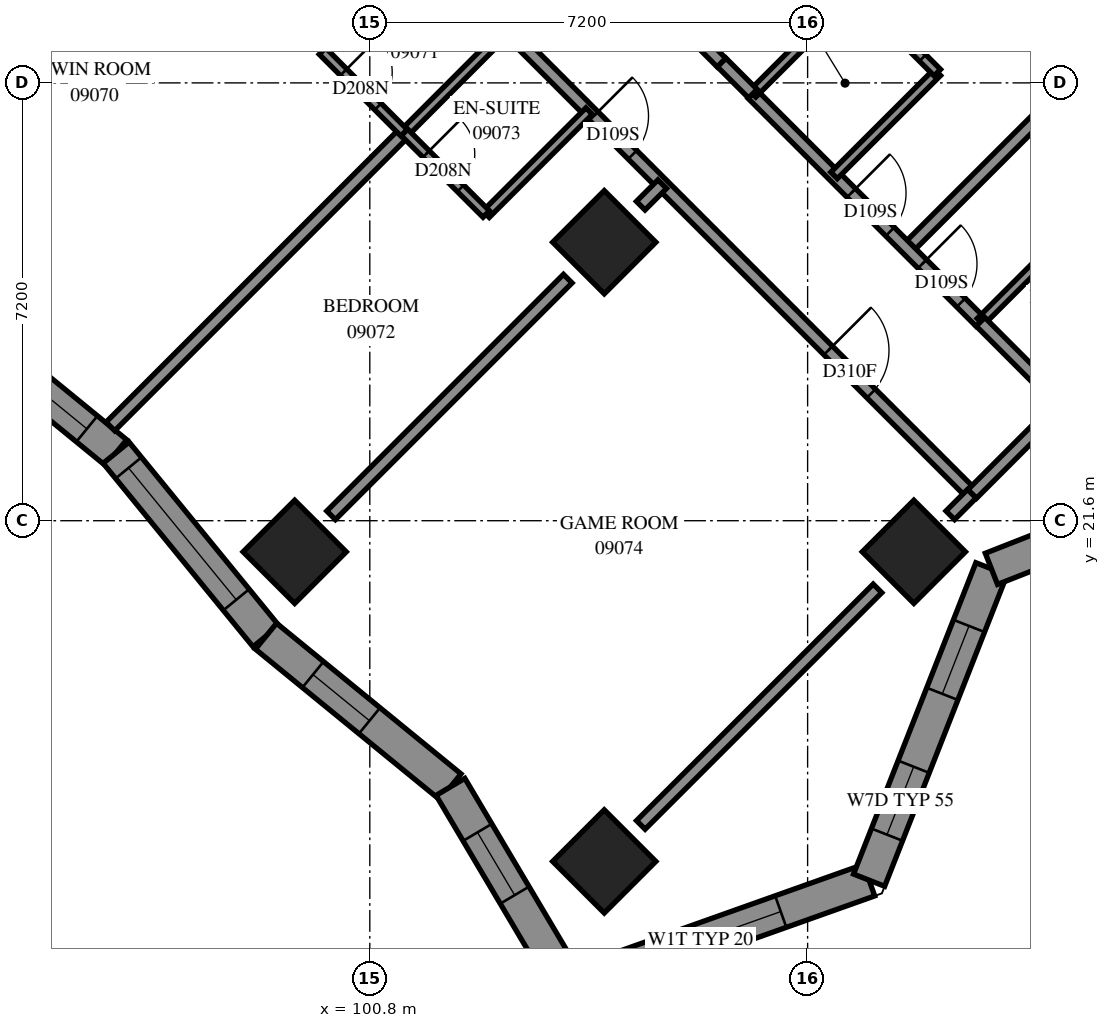
"""IFC4 building model, lengths in metres.
Left out: names, types, materials, properties, quantities, classifications, styles, units other than length and angle.
Written with IfcOpenShell. Run it as: python <this file> out.ifc"""

import sys

from ifc_helpers import new_model, si_unit, direction, frame, frame_2d, origin, origin_2d, place, context, subcontext, project, spatial, polyline, rectangle, outline, extrude, element, fill, save


model = new_model("IFC4")
c1 = context("Model", 3, precision=1e-05, world=origin(), true_north=direction((0.0, 1.0)))
c2 = subcontext(c1, "Body", "Model", "MODEL_VIEW")
j1 = project(units=[si_unit("LENGTHUNIT", "METRE"), si_unit("PLANEANGLEUNIT", "RADIAN")], contexts=[c1])
p1 = place(None, origin())
s1 = spatial("IfcSite", under=j1, at=p1, CompositionType="ELEMENT")
p2 = place(p1, origin())
s2 = spatial("IfcBuilding", under=s1, at=p2, CompositionType="ELEMENT")
p3 = place(p2, frame((0.0, 0.0, 37.2)))
s3 = spatial("IfcBuildingStorey", under=s2, at=p3, CompositionType="ELEMENT", Elevation=37.2)
for number, where, z_axis, x_axis in (
    (1, (104.656, 26.18, 0.0), (0.0, 0.0, 1.0), (0.707, -0.707, 0.0)),
    (2, (99.565, 21.088, 0.0), (0.0, 0.0, 1.0), (0.707, -0.707, 0.0)),
    (3, (109.747, 21.088, 0.0), (0.0, 0.0, 1.0), (0.707, -0.707, 0.0)),
    (4, (104.656, 15.997, 0.0), (0.0, 0.0, 1.0), (0.707, -0.707, 0.0)),
):
    element("IfcColumn", number, at=place(p3, frame(where, z_axis=z_axis, x_axis=x_axis)), inside=s3, PredefinedType="COLUMN", context=c2, shape_type="SweptSolid", body=[
        extrude(rectangle(XDim=1.2, YDim=1.2, at=origin_2d()), origin(), (0.0, 0.0, 1.0), 3.1),
    ])
p4 = place(p3, frame((104.076, 13.934, 0.0), z_axis=(0.0, 0.0, 1.0), x_axis=(0.9422329025, 0.3349584414, 0.0)))
e5 = element("IfcWall", 5, at=p4, inside=s3, PredefinedType="SOLIDWALL", context=c2, shape_type="SweptSolid", body=[
    extrude(outline(polyline([(-0.226, -0.275), (5.363, -0.275), (5.112, 0.275), (0.226, 0.275), (-0.226, -0.275)])), origin(), (0.0, 0.0, 1.0), 3.1),
])
p5 = place(p4, frame((0.895, 0.0, 0.5)))
e6 = element("IfcOpeningElement", 6, at=p5, cuts=e5, PredefinedType="OPENING", context=c2, shape_type="SweptSolid", body=[
    extrude(rectangle(XDim=2.8, YDim=2.45, at=frame_2d((1.4, 1.225))), frame((0.0, 0.285, 0.0), z_axis=(0.0, -1.0, 0.0), x_axis=(1.0, 0.0, 0.0)), (0.0, 0.0, 1.0), 0.57),
])
p6 = place(p3, frame((109.011, 15.689, 0.0), z_axis=(0.0, 0.0, 1.0), x_axis=(0.3657013038, 0.9307322689, 0.0)))
e7 = element("IfcWall", 7, at=p6, inside=s3, PredefinedType="SOLIDWALL", context=c2, shape_type="SweptSolid", body=[
    extrude(outline(polyline([(-0.125, -0.275), (5.381, -0.275), (5.621, 0.275), (0.125, 0.275), (-0.125, -0.275)])), origin(), (0.0, 0.0, 1.0), 3.1),
])
p7 = place(p6, frame((0.804, 0.0, 0.5)))
e8 = element("IfcOpeningElement", 8, at=p7, cuts=e7, PredefinedType="OPENING", context=c2, shape_type="SweptSolid", body=[
    extrude(rectangle(XDim=1.2, YDim=2.45, at=frame_2d((0.6, 1.225))), frame((0.0, 0.285, 0.0), z_axis=(0.0, -1.0, 0.0), x_axis=(1.0, 0.0, 0.0)), (0.0, 0.0, 1.0), 0.57),
])
p8 = place(p6, frame((3.292, 0.0, 0.5)))
e9 = element("IfcOpeningElement", 9, at=p8, cuts=e7, PredefinedType="OPENING", context=c2, shape_type="SweptSolid", body=[
    extrude(rectangle(XDim=1.2, YDim=2.45, at=frame_2d((0.6, 1.225))), frame((0.0, 0.285, 0.0), z_axis=(0.0, -1.0, 0.0), x_axis=(1.0, 0.0, 0.0)), (0.0, 0.0, 1.0), 0.57),
])
p9 = place(p3, frame((111.023, 20.809, 0.0), z_axis=(0.0, 0.0, 1.0), x_axis=(0.9307322689, 0.3657013038, 0.0)))
e10 = element("IfcWall", 10, at=p9, inside=s3, PredefinedType="SOLIDWALL", context=c2, shape_type="SweptSolid", body=[
    extrude(outline(polyline([(0.12, -0.275), (5.626, -0.275), (5.376, 0.275), (-0.12, 0.275), (0.12, -0.275)])), origin(), (0.0, 0.0, 1.0), 3.1),
])
p10 = place(p9, frame((1.154, 0.0, 0.5)))
e11 = element("IfcOpeningElement", 11, at=p10, cuts=e10, PredefinedType="OPENING", context=c2, shape_type="SweptSolid", body=[
    extrude(rectangle(XDim=2.8, YDim=2.45, at=frame_2d((1.4, 1.225))), frame((0.0, 0.285, 0.0), z_axis=(0.0, -1.0, 0.0), x_axis=(1.0, 0.0, 0.0)), (0.0, 0.0, 1.0), 0.57),
])
p11 = place(p3, frame((93.611, 25.183, 0.0), z_axis=(0.0, 0.0, 1.0), x_axis=(0.7744956586, -0.6325792241, 0.0)))
e12 = element("IfcWall", 12, at=p11, inside=s3, PredefinedType="SOLIDWALL", context=c2, shape_type="SweptSolid", body=[
    extrude(outline(polyline([(-0.028, -0.275), (3.868, -0.275), (3.924, 0.275), (0.028, 0.275), (-0.028, -0.275)])), origin(), (0.0, 0.0, 1.0), 3.1),
])
p12 = place(p11, frame((0.475, 0.0, 0.5)))
e13 = element("IfcOpeningElement", 13, at=p12, cuts=e12, PredefinedType="OPENING", context=c2, shape_type="SweptSolid", body=[
    extrude(rectangle(XDim=2.8, YDim=2.45, at=frame_2d((1.4, 1.225))), frame((0.0, 0.285, 0.0), z_axis=(0.0, -1.0, 0.0), x_axis=(1.0, 0.0, 0.0)), (0.0, 0.0, 1.0), 0.57),
])
p13 = place(p3, frame((96.628, 22.718, 0.0), z_axis=(0.0, 0.0, 1.0), x_axis=(0.6325792241, -0.7744956586, 0.0)))
e14 = element("IfcWall", 14, at=p13, inside=s3, PredefinedType="SOLIDWALL", context=c2, shape_type="SweptSolid", body=[
    extrude(outline(polyline([(0.028, -0.275), (3.924, -0.275), (3.868, 0.275), (-0.028, 0.275), (0.028, -0.275)])), origin(), (0.0, 0.0, 1.0), 3.1),
])
p14 = place(p13, frame((0.323, 0.0, 0.5)))
e15 = element("IfcOpeningElement", 15, at=p14, cuts=e14, PredefinedType="OPENING", context=c2, shape_type="SweptSolid", body=[
    extrude(rectangle(XDim=2.8, YDim=2.45, at=frame_2d((1.4, 1.225))), frame((0.0, 0.285, 0.0), z_axis=(0.0, -1.0, 0.0), x_axis=(1.0, 0.0, 0.0)), (0.0, 0.0, 1.0), 0.57),
])
p15 = place(p3, frame((99.093, 19.701, 0.0), z_axis=(0.0, 0.0, 1.0), x_axis=(0.7744973138, -0.6325771976, 0.0)))
e16 = element("IfcWall", 16, at=p15, inside=s3, PredefinedType="SOLIDWALL", context=c2, shape_type="SweptSolid", body=[
    extrude(outline(polyline([(-0.028, -0.275), (3.868, -0.275), (3.966, 0.275), (0.028, 0.275), (-0.028, -0.275)])), origin(), (0.0, 0.0, 1.0), 3.1),
])
p16 = place(p15, frame((0.998, 0.0, 0.5)))
e17 = element("IfcOpeningElement", 17, at=p16, cuts=e16, PredefinedType="OPENING", context=c2, shape_type="SweptSolid", body=[
    extrude(rectangle(XDim=1.2, YDim=2.45, at=frame_2d((0.6, 1.225))), frame((0.0, 0.285, 0.0), z_axis=(0.0, -1.0, 0.0), x_axis=(1.0, 0.0, 0.0)), (0.0, 0.0, 1.0), 0.57),
])
p17 = place(p3, frame((102.126, 17.223, 0.0), z_axis=(0.0, 0.0, 1.0), x_axis=(0.5099421862, -0.8602086763, 0.0)))
e18 = element("IfcWall", 18, at=p17, inside=s3, PredefinedType="SOLIDWALL", context=c2, shape_type="SweptSolid", body=[
    extrude(outline(polyline([(0.049, -0.275), (4.05, -0.275), (3.597, 0.275), (-0.049, 0.275), (0.049, -0.275)])), origin(), (0.0, 0.0, 1.0), 3.1),
])
p18 = place(p17, frame((0.87, 0.0, 0.5)))
e19 = element("IfcOpeningElement", 19, at=p18, cuts=e18, PredefinedType="OPENING", context=c2, shape_type="SweptSolid", body=[
    extrude(rectangle(XDim=1.2, YDim=2.45, at=frame_2d((0.6, 1.225))), frame((0.0, 0.285, 0.0), z_axis=(0.0, -1.0, 0.0), x_axis=(1.0, 0.0, 0.0)), (0.0, 0.0, 1.0), 0.57),
])
p19 = place(p3, frame((103.061, 29.677, 0.0), z_axis=(0.0, 0.0, 1.0), x_axis=(0.7071067812, -0.7071067812, 0.0)))
e20 = element("IfcWall", 20, at=p19, inside=s3, PredefinedType="PARTITIONING", context=c2, shape_type="SweptSolid", body=[
    extrude(rectangle(XDim=10.802, YDim=0.2, at=frame_2d((5.401, 0.0))), origin(), (0.0, 0.0, 1.0), 3.1),
])
p20 = place(p19, frame((2.012, 0.0, 0.0)))
e21 = element("IfcOpeningElement", 21, at=p20, cuts=e20, PredefinedType="OPENING", context=c2, shape_type="SweptSolid", body=[
    extrude(rectangle(XDim=0.9, YDim=2.1, at=frame_2d((0.45, 1.05))), frame((0.0, 0.11, 0.0), z_axis=(0.0, -1.0, 0.0), x_axis=(1.0, 0.0, 0.0)), (0.0, 0.0, 1.0), 0.22),
])
p21 = place(p19, frame((7.463, 0.0, 0.0)))
e22 = element("IfcOpeningElement", 22, at=p21, cuts=e20, PredefinedType="OPENING", context=c2, shape_type="SweptSolid", body=[
    extrude(rectangle(XDim=1.0, YDim=2.1, at=frame_2d((0.5, 1.05))), frame((0.0, 0.11, 0.0), z_axis=(0.0, -1.0, 0.0), x_axis=(1.0, 0.0, 0.0)), (0.0, 0.0, 1.0), 0.22),
])
p22 = place(p3, frame((96.534, 23.151, 0.0), z_axis=(0.0, 0.0, 1.0), x_axis=(0.7071067812, 0.7071067812, 0.0)))
e23 = element("IfcWall", 23, at=p22, inside=s3, PredefinedType="PARTITIONING", context=c2, shape_type="SweptSolid", body=[
    extrude(rectangle(XDim=6.835, YDim=0.2, at=frame_2d((3.417, 0.0))), origin(), (0.0, 0.0, 1.0), 3.1),
])
p23 = place(p3, frame((91.457, 28.255, 0.0), z_axis=(0.0, 0.0, 1.0), x_axis=(0.7071067812, 0.7071067812, 0.0)))
e24 = element("IfcWall", 24, at=p23, inside=s3, PredefinedType="PARTITIONING", context=c2, shape_type="SweptSolid", body=[
    extrude(rectangle(XDim=6.815, YDim=0.2, at=frame_2d((3.408, 0.0))), origin(), (0.0, 0.0, 1.0), 3.1),
])
p24 = place(p3, frame((109.64, 26.074, 0.0), z_axis=(0.0, 0.0, 1.0), x_axis=(0.7072538194, 0.7069597124, 0.0)))
e25 = element("IfcWall", 25, at=p24, inside=s3, PredefinedType="PARTITIONING", context=c2, shape_type="SweptSolid", body=[
    extrude(rectangle(XDim=6.8, YDim=0.2, at=frame_2d((3.4, 0.0))), origin(), (0.0, 0.0, 1.0), 3.1),
])
p25 = place(p3, frame((100.163, 21.689, 0.0), z_axis=(0.0, 0.0, 1.0), x_axis=(0.7071067812, 0.7071067812, 0.0)))
e26 = element("IfcWall", 26, at=p25, inside=s3, PredefinedType="PARTITIONING", context=c2, shape_type="SweptSolid", body=[
    extrude(rectangle(XDim=5.504, YDim=0.2, at=frame_2d((2.752, 0.0))), origin(), (0.0, 0.0, 1.0), 3.1),
])
p26 = place(p3, frame((105.257, 16.597, 0.0), z_axis=(0.0, 0.0, 1.0), x_axis=(0.7072884866, 0.706925029, 0.0)))
e27 = element("IfcWall", 27, at=p26, inside=s3, PredefinedType="PARTITIONING", context=c2, shape_type="SweptSolid", body=[
    extrude(rectangle(XDim=5.503, YDim=0.2, at=frame_2d((2.751, 0.0))), origin(), (0.0, 0.0, 1.0), 2.6),
])
p27 = place(p3, frame((107.093, 28.615, 0.0), z_axis=(0.0, 0.0, 1.0), x_axis=(0.7072011313, -0.7070124185, 0.0)))
e28 = element("IfcWall", 28, at=p27, inside=s3, PredefinedType="PARTITIONING", context=c2, shape_type="SweptSolid", body=[
    extrude(rectangle(XDim=5.299, YDim=0.2, at=frame_2d((2.65, 0.0))), origin(), (0.0, 0.0, 1.0), 3.1),
])
p28 = place(p27, frame((2.299, 0.0, 0.0)))
e29 = element("IfcOpeningElement", 29, at=p28, cuts=e28, PredefinedType="OPENING", context=c2, shape_type="SweptSolid", body=[
    extrude(rectangle(XDim=0.9, YDim=2.1, at=frame_2d((0.45, 1.05))), frame((0.0, 0.11, 0.0), z_axis=(0.0, -1.0, 0.0), x_axis=(1.0, 0.0, 0.0)), (0.0, 0.0, 1.0), 0.22),
])
p29 = place(p27, frame((3.949, 0.0, 0.0)))
e30 = element("IfcOpeningElement", 30, at=p29, cuts=e28, PredefinedType="OPENING", context=c2, shape_type="SweptSolid", body=[
    extrude(rectangle(XDim=0.9, YDim=2.1, at=frame_2d((0.45, 1.05))), frame((0.0, 0.11, 0.0), z_axis=(0.0, -1.0, 0.0), x_axis=(1.0, 0.0, 0.0)), (0.0, 0.0, 1.0), 0.22),
])
p30 = place(p3, frame((104.551, 31.165, 0.0), z_axis=(0.0, 0.0, 1.0), x_axis=(0.7074545101, -0.7067588812, 0.0)))
e31 = element("IfcWall", 31, at=p30, inside=s3, PredefinedType="PARTITIONING", context=c2, shape_type="SweptSolid", body=[
    extrude(rectangle(XDim=2.875, YDim=0.2, at=frame_2d((1.438, 0.0))), origin(), (0.0, 0.0, 1.0), 3.1),
])
p31 = place(p30, frame((0.148, 0.0, 0.0)))
e32 = element("IfcOpeningElement", 32, at=p31, cuts=e31, PredefinedType="OPENING", context=c2, shape_type="SweptSolid", body=[
    extrude(rectangle(XDim=0.9, YDim=2.1, at=frame_2d((0.45, 1.05))), frame((0.0, 0.11, 0.0), z_axis=(0.0, -1.0, 0.0), x_axis=(1.0, 0.0, 0.0)), (0.0, 0.0, 1.0), 0.22),
])
p32 = place(p3, frame((100.023, 29.327, 0.0), z_axis=(0.0, 0.0, 1.0), x_axis=(0.7071067812, 0.7071067812, 0.0)))
e33 = element("IfcWall", 33, at=p32, inside=s3, PredefinedType="PARTITIONING", context=c2, shape_type="SweptSolid", body=[
    extrude(rectangle(XDim=2.401, YDim=0.15, at=frame_2d((1.201, 0.0))), origin(), (0.0, 0.0, 1.0), 3.1),
])
for number, where, z_axis, x_axis in (
    (34, (101.371, 27.979, 0.0), (0.0, 0.0, 1.0), (0.707, 0.708, 0.0)),
    (35, (108.435, 27.279, 0.0), (0.0, 0.0, 1.0), (0.708, 0.707, 0.0)),
):
    element("IfcWall", number, at=place(p3, frame(where, z_axis=z_axis, x_axis=x_axis)), inside=s3, PredefinedType="PARTITIONING", context=c2, shape_type="SweptSolid", body=[
        extrude(rectangle(XDim=2.4, YDim=0.15, at=frame_2d((1.2, 0.0))), origin(), (0.0, 0.0, 1.0), 3.1),
    ])
for number, where, z_axis, x_axis in (
    (36, (102.711, 26.641, 0.0), (0.0, 0.0, 1.0), (0.707, 0.707, 0.0)),
    (37, (107.095, 28.621, 0.0), (0.0, 0.0, 1.0), (0.707, 0.707, 0.0)),
    (38, (110.843, 24.873, 0.0), (0.0, 0.0, 1.0), (0.707, 0.707, 0.0)),
):
    element("IfcWall", number, at=place(p3, frame(where, z_axis=z_axis, x_axis=x_axis)), inside=s3, PredefinedType="PARTITIONING", context=c2, shape_type="SweptSolid", body=[
        extrude(rectangle(XDim=2.398, YDim=0.15, at=frame_2d((1.199, 0.0))), origin(), (0.0, 0.0, 1.0), 3.1),
    ])
p33 = place(p3, frame((110.705, 22.039, 0.0), z_axis=(0.0, 0.0, 1.0), x_axis=(0.7066304548, 0.7075827869, 0.0)))
e39 = element("IfcWall", 39, at=p33, inside=s3, PredefinedType="PARTITIONING", context=c2, shape_type="SweptSolid", body=[
    extrude(rectangle(XDim=2.1, YDim=0.2, at=frame_2d((1.05, 0.0))), origin(), (0.0, 0.0, 1.0), 2.6),
])
p34 = place(p3, frame((100.021, 29.323, 0.0), z_axis=(0.0, 0.0, 1.0), x_axis=(0.7071067812, -0.7071067812, 0.0)))
e40 = element("IfcWall", 40, at=p34, inside=s3, PredefinedType="PARTITIONING", context=c2, shape_type="SweptSolid", body=[
    extrude(rectangle(XDim=1.901, YDim=0.15, at=frame_2d((0.95, 0.0))), origin(), (0.0, 0.0, 1.0), 3.1),
])
p35 = place(p34, frame((0.491, 0.0, 0.0)))
e41 = element("IfcOpeningElement", 41, at=p35, cuts=e40, PredefinedType="OPENING", context=c2, shape_type="SweptSolid", body=[
    extrude(rectangle(XDim=0.8, YDim=2.1, at=frame_2d((0.4, 1.05))), frame((0.0, 0.085, 0.0), z_axis=(0.0, -1.0, 0.0), x_axis=(1.0, 0.0, 0.0)), (0.0, 0.0, 1.0), 0.17),
])
p36 = place(p3, frame((108.789, 30.313, 0.0), z_axis=(0.0, 0.0, 1.0), x_axis=(0.7071067812, -0.7071067812, 0.0)))
e42 = element("IfcWall", 42, at=p36, inside=s3, PredefinedType="PARTITIONING", context=c2, shape_type="SweptSolid", body=[
    extrude(rectangle(XDim=1.901, YDim=0.15, at=frame_2d((0.95, 0.0))), origin(), (0.0, 0.0, 1.0), 3.1),
])
p37 = place(p36, frame((0.76, 0.0, 0.0)))
e43 = element("IfcOpeningElement", 43, at=p37, cuts=e42, PredefinedType="OPENING", context=c2, shape_type="SweptSolid", body=[
    extrude(rectangle(XDim=0.8, YDim=2.1, at=frame_2d((0.4, 1.05))), frame((0.0, 0.085, 0.0), z_axis=(0.0, -1.0, 0.0), x_axis=(1.0, 0.0, 0.0)), (0.0, 0.0, 1.0), 0.17),
])
p38 = place(p3, frame((110.843, 24.871, 0.0), z_axis=(0.0, 0.0, 1.0), x_axis=(0.7065800724, -0.7076330979, 0.0)))
e44 = element("IfcWall", 44, at=p38, inside=s3, PredefinedType="PARTITIONING", context=c2, shape_type="SweptSolid", body=[
    extrude(rectangle(XDim=1.899, YDim=0.2, at=frame_2d((0.95, 0.0))), origin(), (0.0, 0.0, 1.0), 3.1),
])
p39 = place(p3, frame((101.371, 27.985, 0.0), z_axis=(0.0, 0.0, 1.0), x_axis=(0.7076330979, -0.7065800724, 0.0)))
e45 = element("IfcWall", 45, at=p39, inside=s3, PredefinedType="PARTITIONING", context=c2, shape_type="SweptSolid", body=[
    extrude(rectangle(XDim=1.899, YDim=0.15, at=frame_2d((0.95, 0.0))), origin(), (0.0, 0.0, 1.0), 3.1),
])
p40 = place(p39, frame((0.501, 0.0, 0.0)))
e46 = element("IfcOpeningElement", 46, at=p40, cuts=e45, PredefinedType="OPENING", context=c2, shape_type="SweptSolid", body=[
    extrude(rectangle(XDim=0.8, YDim=2.1, at=frame_2d((0.4, 1.05))), frame((0.0, 0.085, 0.0), z_axis=(0.0, -1.0, 0.0), x_axis=(1.0, 0.0, 0.0)), (0.0, 0.0, 1.0), 0.17),
])
p41 = place(p3, frame((106.587, 29.135, 0.0), z_axis=(0.0, 0.0, 1.0), x_axis=(0.7071067812, -0.7071067812, 0.0)))
e47 = element("IfcWall", 47, at=p41, inside=s3, PredefinedType="PARTITIONING", context=c2, shape_type="SweptSolid", body=[
    extrude(rectangle(XDim=0.724, YDim=0.2, at=frame_2d((0.362, 0.0))), origin(), (0.0, 0.0, 1.0), 3.1),
])
p42 = place(p3, frame((105.255, 26.781, 0.0), z_axis=(0.0, 0.0, 1.0), x_axis=(0.7071067812, 0.7071067812, 0.0)))
e48 = element("IfcWall", 48, at=p42, inside=s3, PredefinedType="PARTITIONING", context=c2, shape_type="SweptSolid", body=[
    extrude(rectangle(XDim=0.501, YDim=0.2, at=frame_2d((0.25, 0.0))), origin(), (0.0, 0.0, 1.0), 3.1),
])
p43 = place(p3, frame((110.347, 21.689, 0.0), z_axis=(0.0, 0.0, 1.0), x_axis=(0.7071067812, 0.7071067812, 0.0)))
e49 = element("IfcWall", 49, at=p43, inside=s3, PredefinedType="PARTITIONING", context=c2, shape_type="SweptSolid", body=[
    extrude(rectangle(XDim=0.501, YDim=0.2, at=frame_2d((0.25, 0.0))), origin(), (0.0, 0.0, 1.0), 2.6),
])
p44 = place(p5, origin())
e50 = element("IfcWindow", 50, at=p44, inside=s3, PartitioningType="SINGLE_PANEL", PredefinedType="WINDOW", context=c2, shape_type="SweptSolid", body=[
    extrude(rectangle(XDim=2.8, YDim=2.45, at=frame_2d((1.4, 1.225))), frame((0.0, 0.155, 0.0), z_axis=(0.0, -1.0, 0.0), x_axis=(1.0, 0.0, 0.0)), (0.0, 0.0, 1.0), 0.06),
])
fill(e6, e50)
p45 = place(p7, origin())
e51 = element("IfcWindow", 51, at=p45, inside=s3, PartitioningType="SINGLE_PANEL", PredefinedType="WINDOW", context=c2, shape_type="SweptSolid", body=[
    extrude(rectangle(XDim=1.2, YDim=2.45, at=frame_2d((0.6, 1.225))), frame((0.0, 0.155, 0.0), z_axis=(0.0, -1.0, 0.0), x_axis=(1.0, 0.0, 0.0)), (0.0, 0.0, 1.0), 0.06),
])
fill(e8, e51)
p46 = place(p8, origin())
e52 = element("IfcWindow", 52, at=p46, inside=s3, PartitioningType="SINGLE_PANEL", PredefinedType="WINDOW", context=c2, shape_type="SweptSolid", body=[
    extrude(rectangle(XDim=1.2, YDim=2.45, at=frame_2d((0.6, 1.225))), frame((0.0, 0.155, 0.0), z_axis=(0.0, -1.0, 0.0), x_axis=(1.0, 0.0, 0.0)), (0.0, 0.0, 1.0), 0.06),
])
fill(e9, e52)
p47 = place(p12, origin())
e53 = element("IfcWindow", 53, at=p47, inside=s3, PartitioningType="SINGLE_PANEL", PredefinedType="WINDOW", context=c2, shape_type="SweptSolid", body=[
    extrude(rectangle(XDim=2.8, YDim=2.45, at=frame_2d((1.4, 1.225))), frame((0.0, 0.155, 0.0), z_axis=(0.0, -1.0, 0.0), x_axis=(1.0, 0.0, 0.0)), (0.0, 0.0, 1.0), 0.06),
])
fill(e13, e53)
p48 = place(p14, origin())
e54 = element("IfcWindow", 54, at=p48, inside=s3, PartitioningType="SINGLE_PANEL", PredefinedType="WINDOW", context=c2, shape_type="SweptSolid", body=[
    extrude(rectangle(XDim=2.8, YDim=2.45, at=frame_2d((1.4, 1.225))), frame((0.0, 0.155, 0.0), z_axis=(0.0, -1.0, 0.0), x_axis=(1.0, 0.0, 0.0)), (0.0, 0.0, 1.0), 0.06),
])
fill(e15, e54)
p49 = place(p16, origin())
e55 = element("IfcWindow", 55, at=p49, inside=s3, PartitioningType="SINGLE_PANEL", PredefinedType="WINDOW", context=c2, shape_type="SweptSolid", body=[
    extrude(rectangle(XDim=1.2, YDim=2.45, at=frame_2d((0.6, 1.225))), frame((0.0, 0.155, 0.0), z_axis=(0.0, -1.0, 0.0), x_axis=(1.0, 0.0, 0.0)), (0.0, 0.0, 1.0), 0.06),
])
fill(e17, e55)
p50 = place(p18, origin())
e56 = element("IfcWindow", 56, at=p50, inside=s3, PartitioningType="SINGLE_PANEL", PredefinedType="WINDOW", context=c2, shape_type="SweptSolid", body=[
    extrude(rectangle(XDim=1.2, YDim=2.45, at=frame_2d((0.6, 1.225))), frame((0.0, 0.155, 0.0), z_axis=(0.0, -1.0, 0.0), x_axis=(1.0, 0.0, 0.0)), (0.0, 0.0, 1.0), 0.06),
])
fill(e19, e56)
p51 = place(p28, origin())
e57 = element("IfcDoor", 57, at=p51, inside=s3, OperationType="SINGLE_SWING_LEFT", PredefinedType="DOOR", context=c2, shape_type="SweptSolid", body=[
    extrude(rectangle(XDim=0.9, YDim=2.1, at=frame_2d((0.45, 1.05))), frame((0.0, 0.025, 0.0), z_axis=(0.0, -1.0, 0.0), x_axis=(1.0, 0.0, 0.0)), (0.0, 0.0, 1.0), 0.05),
])
fill(e29, e57)
p52 = place(p37, origin())
e58 = element("IfcDoor", 58, at=p52, inside=s3, OperationType="SINGLE_SWING_RIGHT", PredefinedType="DOOR", context=c2, shape_type="SweptSolid", body=[
    extrude(rectangle(XDim=0.8, YDim=2.1, at=frame_2d((0.4, 1.05))), frame((0.0, 0.025, 0.0), z_axis=(0.0, -1.0, 0.0), x_axis=(1.0, 0.0, 0.0)), (0.0, 0.0, 1.0), 0.05),
])
fill(e43, e58)
p53 = place(p35, origin())
e59 = element("IfcDoor", 59, at=p53, inside=s3, OperationType="SINGLE_SWING_RIGHT", PredefinedType="DOOR", context=c2, shape_type="SweptSolid", body=[
    extrude(rectangle(XDim=0.8, YDim=2.1, at=frame_2d((0.4, 1.05))), frame((0.0, 0.025, 0.0), z_axis=(0.0, -1.0, 0.0), x_axis=(1.0, 0.0, 0.0)), (0.0, 0.0, 1.0), 0.05),
])
fill(e41, e59)
p54 = place(p20, origin())
e60 = element("IfcDoor", 60, at=p54, inside=s3, OperationType="SINGLE_SWING_LEFT", PredefinedType="DOOR", context=c2, shape_type="SweptSolid", body=[
    extrude(rectangle(XDim=0.9, YDim=2.1, at=frame_2d((0.45, 1.05))), frame((0.0, 0.025, 0.0), z_axis=(0.0, -1.0, 0.0), x_axis=(1.0, 0.0, 0.0)), (0.0, 0.0, 1.0), 0.05),
])
fill(e21, e60)
p55 = place(p40, origin())
e61 = element("IfcDoor", 61, at=p55, inside=s3, OperationType="SINGLE_SWING_RIGHT", PredefinedType="DOOR", context=c2, shape_type="SweptSolid", body=[
    extrude(rectangle(XDim=0.8, YDim=2.1, at=frame_2d((0.4, 1.05))), frame((0.0, 0.025, 0.0), z_axis=(0.0, -1.0, 0.0), x_axis=(1.0, 0.0, 0.0)), (0.0, 0.0, 1.0), 0.05),
])
fill(e46, e61)
p56 = place(p21, origin())
e62 = element("IfcDoor", 62, at=p56, inside=s3, OperationType="SINGLE_SWING_RIGHT", PredefinedType="DOOR", context=c2, shape_type="SweptSolid", body=[
    extrude(rectangle(XDim=1.0, YDim=2.1, at=frame_2d((0.5, 1.05))), frame((0.0, 0.025, 0.0), z_axis=(0.0, -1.0, 0.0), x_axis=(1.0, 0.0, 0.0)), (0.0, 0.0, 1.0), 0.05),
])
fill(e22, e62)
p57 = place(p29, origin())
e63 = element("IfcDoor", 63, at=p57, inside=s3, OperationType="SINGLE_SWING_RIGHT", PredefinedType="DOOR", context=c2, shape_type="SweptSolid", body=[
    extrude(rectangle(XDim=0.9, YDim=2.1, at=frame_2d((0.45, 1.05))), frame((0.0, 0.025, 0.0), z_axis=(0.0, -1.0, 0.0), x_axis=(1.0, 0.0, 0.0)), (0.0, 0.0, 1.0), 0.05),
])
fill(e30, e63)
save(model, sys.argv[1])
